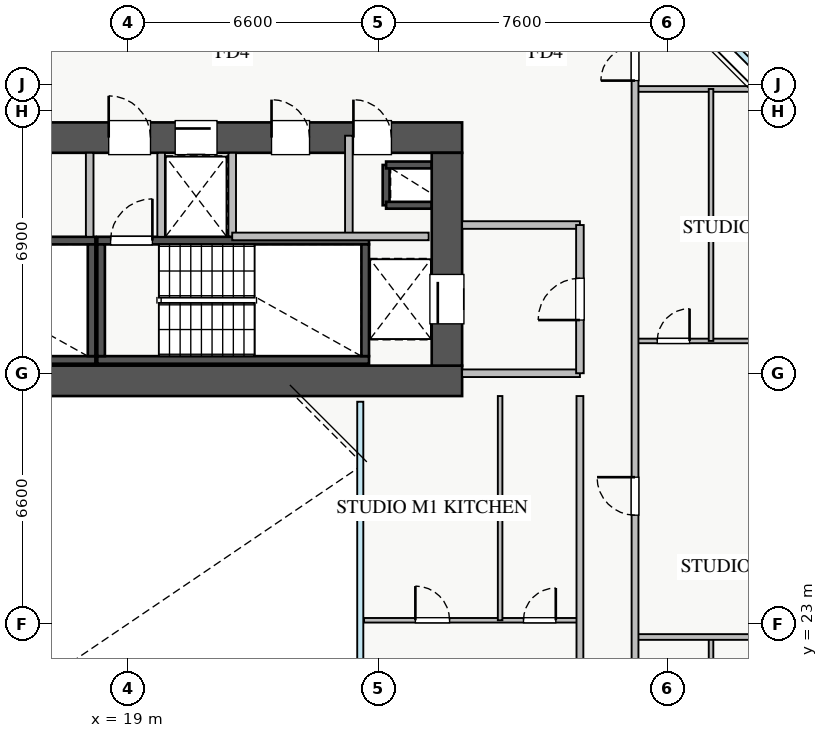
"""IFC4 building model, lengths in metres.
Left out: names, types, materials, properties, quantities, classifications, styles, units other than length and angle.
Written with IfcOpenShell. Run it as: python <this file> out.ifc"""

import sys

from ifc_helpers import new_model, si_unit, direction, frame, frame_2d, origin, place, context, subcontext, project, spatial, rectangle, extrude, source, transform, mapped, element, fill, save


model = new_model("IFC4")
c1 = context("Model", 3, precision=1e-05, world=origin(), true_north=direction((0.0, 1.0)))
c2 = subcontext(c1, "Body", "Model", "MODEL_VIEW")
j1 = project(units=[si_unit("LENGTHUNIT", "METRE"), si_unit("PLANEANGLEUNIT", "RADIAN")], contexts=[c1])
p1 = place(None, origin())
s1 = spatial("IfcSite", under=j1, at=p1, CompositionType="ELEMENT")
p2 = place(p1, origin())
s2 = spatial("IfcBuilding", under=s1, at=p2, CompositionType="ELEMENT")
p3 = place(p2, frame((0.0, 0.0, 86.0)))
s3 = spatial("IfcBuildingStorey", under=s2, at=p3, CompositionType="ELEMENT", Elevation=86.0)
p4 = place(p3, frame((25.8, 34.02, 0.0), z_axis=(0.0, 0.0, 1.0), x_axis=(0.0, 1.0, 0.0)))
e1 = element("IfcWall", 1, at=p4, inside=s3, PredefinedType="SHEAR", context=c2, shape_type="SweptSolid", body=[
    extrude(rectangle(XDim=1.06, YDim=0.18, at=frame_2d((0.53, 0.0))), origin(), (0.0, 0.0, 1.0), 3.07),
])
for number, where, z_axis, x_axis in (
    (2, (25.8, 35.08, 0.0), (0.0, 0.0, 1.0), (1.0, 0.0, 0.0)),
    (3, (25.8, 34.02, 0.0), (0.0, 0.0, 1.0), (1.0, 0.0, 0.0)),
):
    element("IfcWall", number, at=place(p3, frame(where, z_axis=z_axis, x_axis=x_axis)), inside=s3, PredefinedType="SHEAR", context=c2, shape_type="SweptSolid", body=[
        extrude(rectangle(XDim=1.2, YDim=0.18, at=frame_2d((0.6, 0.0))), origin(), (0.0, 0.0, 1.0), 3.07),
    ])
p5 = place(p3, frame((19.88, 33.2, 0.0), z_axis=(0.0, 0.0, 1.0), x_axis=(1.0, 0.0, 0.0)))
e4 = element("IfcWall", 4, at=p5, inside=s3, PredefinedType="SHEAR", context=c2, shape_type="SweptSolid", body=[
    extrude(rectangle(XDim=1.87, YDim=0.18, at=frame_2d((0.935, 0.0))), origin(), (0.0, 0.0, 1.0), 3.07),
])
p6 = place(p3, frame((11.0, 29.95, 0.0), z_axis=(0.0, 0.0, 1.0), x_axis=(1.0, 0.0, 0.0)))
e5 = element("IfcWall", 5, at=p6, inside=s3, PredefinedType="SHEAR", context=c2, shape_type="SweptSolid", body=[
    extrude(rectangle(XDim=7.15, YDim=0.2, at=frame_2d((3.575, 0.0))), origin(), (0.0, 0.0, 1.0), 3.25),
])
p7 = place(p3, frame((11.0, 33.09, 0.0), z_axis=(0.0, 0.0, 1.0), x_axis=(1.0, 0.0, 0.0)))
e6 = element("IfcWall", 6, at=p7, inside=s3, PredefinedType="SHEAR", context=c2, shape_type="SweptSolid", body=[
    extrude(rectangle(XDim=7.15, YDim=0.2, at=frame_2d((3.575, 0.0))), origin(), (0.0, 0.0, 1.0), 3.25),
])
p8 = place(p7, frame((0.35, 0.0, 0.0)))
e7 = element("IfcOpeningElement", 7, at=p8, cuts=e6, PredefinedType="OPENING", context=c2, shape_type="SweptSolid", body=[
    extrude(rectangle(XDim=1.1, YDim=2.05, at=frame_2d((0.55, 1.025))), frame((0.0, 0.11, 0.0), z_axis=(0.0, -1.0, 0.0), x_axis=(1.0, 0.0, 0.0)), (0.0, 0.0, 1.0), 0.22),
])
p9 = place(p3, frame((18.05, 30.05, 0.0), z_axis=(0.0, 0.0, 1.0), x_axis=(0.0, 1.0, 0.0)))
e8 = element("IfcWall", 8, at=p9, inside=s3, PredefinedType="SHEAR", context=c2, shape_type="SweptSolid", body=[
    extrude(rectangle(XDim=2.94, YDim=0.2, at=frame_2d((1.47, 0.0))), origin(), (0.0, 0.0, 1.0), 3.25),
])
p10 = place(p3, frame((18.2, 29.95, 0.0), z_axis=(0.0, 0.0, 1.0), x_axis=(1.0, 0.0, 0.0)))
e9 = element("IfcWall", 9, at=p10, inside=s3, PredefinedType="SHEAR", context=c2, shape_type="SweptSolid", body=[
    extrude(rectangle(XDim=7.15, YDim=0.2, at=frame_2d((3.575, 0.0))), origin(), (0.0, 0.0, 1.0), 3.25),
])
p11 = place(p3, frame((18.2, 33.09, 0.0), z_axis=(0.0, 0.0, 1.0), x_axis=(1.0, 0.0, 0.0)))
e10 = element("IfcWall", 10, at=p11, inside=s3, PredefinedType="SHEAR", context=c2, shape_type="SweptSolid", body=[
    extrude(rectangle(XDim=7.15, YDim=0.2, at=frame_2d((3.575, 0.0))), origin(), (0.0, 0.0, 1.0), 3.25),
])
p12 = place(p11, frame((0.35, 0.0, 0.0)))
e11 = element("IfcOpeningElement", 11, at=p12, cuts=e10, PredefinedType="OPENING", context=c2, shape_type="SweptSolid", body=[
    extrude(rectangle(XDim=1.1, YDim=2.05, at=frame_2d((0.55, 1.025))), frame((0.0, 0.11, 0.0), z_axis=(0.0, -1.0, 0.0), x_axis=(1.0, 0.0, 0.0)), (0.0, 0.0, 1.0), 0.22),
])
for number, where, z_axis, x_axis in (
    (12, (18.3, 30.05, 0.0), (0.0, 0.0, 1.0), (0.0, 1.0, 0.0)),
    (13, (25.25, 30.05, 0.0), (0.0, 0.0, 1.0), (0.0, 1.0, 0.0)),
):
    element("IfcWall", number, at=place(p3, frame(where, z_axis=z_axis, x_axis=x_axis)), inside=s3, PredefinedType="SHEAR", context=c2, shape_type="SweptSolid", body=[
        extrude(rectangle(XDim=2.94, YDim=0.2, at=frame_2d((1.47, 0.0))), origin(), (0.0, 0.0, 1.0), 3.25),
    ])
p13 = place(p3, frame((10.2, 29.4, 0.0), z_axis=(0.0, 0.0, 1.0), x_axis=(1.0, 0.0, 0.0)))
e14 = element("IfcWall", 14, at=p13, inside=s3, PredefinedType="SHEAR", context=c2, shape_type="SweptSolid", body=[
    extrude(rectangle(XDim=17.6, YDim=0.8, at=frame_2d((8.8, 0.0))), origin(), (0.0, 0.0, 1.0), 3.25),
])
p14 = place(p3, frame((10.2, 35.8, 0.0), z_axis=(0.0, 0.0, 1.0), x_axis=(1.0, 0.0, 0.0)))
e15 = element("IfcWall", 15, at=p14, inside=s3, PredefinedType="SHEAR", context=c2, shape_type="SweptSolid", body=[
    extrude(rectangle(XDim=17.6, YDim=0.8, at=frame_2d((8.8, 0.0))), origin(), (0.0, 0.0, 1.0), 3.25),
])
p15 = place(p14, frame((1.15, 0.0, 0.0)))
e16 = element("IfcOpeningElement", 16, at=p15, cuts=e15, PredefinedType="OPENING", context=c2, shape_type="SweptSolid", body=[
    extrude(rectangle(XDim=1.1, YDim=2.05, at=frame_2d((0.55, 1.025))), frame((0.0, 0.41, 0.0), z_axis=(0.0, -1.0, 0.0), x_axis=(1.0, 0.0, 0.0)), (0.0, 0.0, 1.0), 0.82),
])
p16 = place(p14, frame((8.3, 0.0, 0.0)))
e17 = element("IfcOpeningElement", 17, at=p16, cuts=e15, PredefinedType="OPENING", context=c2, shape_type="SweptSolid", body=[
    extrude(rectangle(XDim=1.1, YDim=2.05, at=frame_2d((0.55, 1.025))), frame((0.0, 0.41, 0.0), z_axis=(0.0, -1.0, 0.0), x_axis=(1.0, 0.0, 0.0)), (0.0, 0.0, 1.0), 0.82),
])
p17 = place(p14, frame((10.05, 0.0, 0.0)))
e18 = element("IfcOpeningElement", 18, at=p17, cuts=e15, PredefinedType="OPENING", context=c2, shape_type="SweptSolid", body=[
    extrude(rectangle(XDim=1.1, YDim=2.05, at=frame_2d((0.55, 1.025))), frame((0.0, 0.41, 0.0), z_axis=(0.0, -1.0, 0.0), x_axis=(1.0, 0.0, 0.0)), (0.0, 0.0, 1.0), 0.82),
])
p18 = place(p14, frame((14.74, 0.0, 0.0)))
e19 = element("IfcOpeningElement", 19, at=p18, cuts=e15, PredefinedType="OPENING", context=c2, shape_type="SweptSolid", body=[
    extrude(rectangle(XDim=1.0, YDim=2.05, at=frame_2d((0.5, 1.025))), frame((0.0, 0.41, 0.0), z_axis=(0.0, -1.0, 0.0), x_axis=(1.0, 0.0, 0.0)), (0.0, 0.0, 1.0), 0.82),
])
p19 = place(p14, frame((12.585, 0.0, 0.0)))
e20 = element("IfcOpeningElement", 20, at=p19, cuts=e15, PredefinedType="OPENING", context=c2, shape_type="SweptSolid", body=[
    extrude(rectangle(XDim=1.0, YDim=2.05, at=frame_2d((0.5, 1.025))), frame((0.0, 0.41, 0.0), z_axis=(0.0, -1.0, 0.0), x_axis=(1.0, 0.0, 0.0)), (0.0, 0.0, 1.0), 0.82),
])
p20 = place(p3, frame((27.4, 29.8, 0.0), z_axis=(0.0, 0.0, 1.0), x_axis=(0.0, 1.0, 0.0)))
e21 = element("IfcWall", 21, at=p20, inside=s3, PredefinedType="SHEAR", context=c2, shape_type="SweptSolid", body=[
    extrude(rectangle(XDim=5.6, YDim=0.8, at=frame_2d((2.8, 0.0))), origin(), (0.0, 0.0, 1.0), 3.25),
])
p21 = place(p20, frame((1.1, 0.0, 0.0)))
e22 = element("IfcOpeningElement", 22, at=p21, cuts=e21, PredefinedType="OPENING", context=c2, shape_type="SweptSolid", body=[
    extrude(rectangle(XDim=1.3, YDim=2.05, at=frame_2d((0.65, 1.025))), frame((0.0, 0.41, 0.0), z_axis=(0.0, -1.0, 0.0), x_axis=(1.0, 0.0, 0.0)), (0.0, 0.0, 1.0), 0.82),
])
for number, where, z_axis, x_axis in (
    (23, (27.8, 29.6, 0.0), (0.0, 0.0, 1.0), (1.0, 0.0, 0.0)),
    (24, (27.8, 33.5, 0.0), (0.0, 0.0, 1.0), (1.0, 0.0, 0.0)),
):
    element("IfcWall", number, at=place(p3, frame(where, z_axis=z_axis, x_axis=x_axis)), inside=s3, PredefinedType="PARTITIONING", context=c2, shape_type="SweptSolid", body=[
        extrude(rectangle(XDim=3.1, YDim=0.2, at=frame_2d((1.55, 0.0))), origin(), (0.0, 0.0, 1.0), 3.07),
    ])
p22 = place(p3, frame((30.9, 29.6, 0.0), z_axis=(0.0, 0.0, 1.0), x_axis=(0.0, 1.0, 0.0)))
e25 = element("IfcWall", 25, at=p22, inside=s3, PredefinedType="PARTITIONING", context=c2, shape_type="SweptSolid", body=[
    extrude(rectangle(XDim=3.9, YDim=0.2, at=frame_2d((1.95, 0.0))), origin(), (0.0, 0.0, 1.0), 3.07),
])
p23 = place(p22, frame((1.4, 0.0, 0.0)))
e26 = element("IfcOpeningElement", 26, at=p23, cuts=e25, PredefinedType="OPENING", context=c2, shape_type="SweptSolid", body=[
    extrude(rectangle(XDim=1.1, YDim=2.05, at=frame_2d((0.55, 1.025))), frame((0.0, 0.11, 0.0), z_axis=(0.0, -1.0, 0.0), x_axis=(1.0, 0.0, 0.0)), (0.0, 0.0, 1.0), 0.22),
])
for number, where, z_axis, x_axis in (
    (27, (18.0, 33.19, 0.0), (0.0, 0.0, 1.0), (0.0, 1.0, 0.0)),
    (28, (19.88, 33.19, 0.0), (0.0, 0.0, 1.0), (0.0, 1.0, 0.0)),
):
    element("IfcWall", number, at=place(p3, frame(where, z_axis=z_axis, x_axis=x_axis)), inside=s3, PredefinedType="PARTITIONING", context=c2, shape_type="SweptSolid", body=[
        extrude(rectangle(XDim=2.21, YDim=0.2, at=frame_2d((1.105, 0.0))), origin(), (0.0, 0.0, 1.0), 3.07),
    ])
p24 = place(p3, frame((24.82, 33.2, 0.0), z_axis=(0.0, 0.0, 1.0), x_axis=(0.0, 1.0, 0.0)))
e29 = element("IfcWall", 29, at=p24, inside=s3, PredefinedType="PARTITIONING", context=c2, shape_type="SweptSolid", body=[
    extrude(rectangle(XDim=2.65, YDim=0.2, at=frame_2d((1.325, 0.0))), origin(), (0.0, 0.0, 1.0), 3.07),
])
p25 = place(p3, frame((21.75, 33.2, 0.0), z_axis=(0.0, 0.0, 1.0), x_axis=(0.0, 1.0, 0.0)))
e30 = element("IfcWall", 30, at=p25, inside=s3, PredefinedType="PARTITIONING", context=c2, shape_type="SweptSolid", body=[
    extrude(rectangle(XDim=2.2, YDim=0.2, at=frame_2d((1.1, 0.0))), origin(), (0.0, 0.0, 1.0), 3.07),
])
p26 = place(p3, frame((21.75, 33.2, 0.0), z_axis=(0.0, 0.0, 1.0), x_axis=(1.0, 0.0, 0.0)))
e31 = element("IfcWall", 31, at=p26, inside=s3, PredefinedType="PARTITIONING", context=c2, shape_type="SweptSolid", body=[
    extrude(rectangle(XDim=5.17, YDim=0.2, at=frame_2d((2.585, 0.0))), origin(), (0.0, 0.0, 1.0), 3.07),
])
p27 = place(p3, frame((32.35, 37.08, 0.0), z_axis=(0.0, 0.0, 1.0), x_axis=(1.0, 0.0, 0.0)))
e32 = element("IfcWall", 32, at=p27, inside=s3, PredefinedType="PARTITIONING", context=c2, shape_type="SweptSolid", body=[
    extrude(rectangle(XDim=5.4, YDim=0.15, at=frame_2d((2.7, 0.0))), origin(), (0.0, 0.0, 1.0), 3.07),
])
p28 = place(p3, frame((34.35, 16.34, 0.0), z_axis=(0.0, 0.0, 1.0), x_axis=(0.0, 1.0, 0.0)))
e33 = element("IfcWall", 33, at=p28, inside=s3, PredefinedType="PLUMBINGWALL", context=c2, shape_type="SweptSolid", body=[
    extrude(rectangle(XDim=6.32, YDim=0.12, at=frame_2d((3.16, 0.0))), origin(), (0.0, 0.0, 1.0), 3.07),
])
p29 = place(p3, frame((32.35, 30.45, 0.0), z_axis=(0.0, 0.0, 1.0), x_axis=(1.0, 0.0, 0.0)))
e34 = element("IfcWall", 34, at=p29, inside=s3, PredefinedType="PLUMBINGWALL", context=c2, shape_type="SweptSolid", body=[
    extrude(rectangle(XDim=5.4, YDim=0.12, at=frame_2d((2.7, 0.0))), origin(), (0.0, 0.0, 1.0), 3.07),
])
p30 = place(p29, frame((0.585, 0.0, 0.0)))
e35 = element("IfcOpeningElement", 35, at=p30, cuts=e34, PredefinedType="OPENING", context=c2, shape_type="SweptSolid", body=[
    extrude(rectangle(XDim=0.85, YDim=2.05, at=frame_2d((0.425, 1.025))), frame((0.0, 0.07, 0.0), z_axis=(0.0, -1.0, 0.0), x_axis=(1.0, 0.0, 0.0)), (0.0, 0.0, 1.0), 0.14),
])
p31 = place(p29, frame((3.24, 0.0, 0.0)))
e36 = element("IfcOpeningElement", 36, at=p31, cuts=e34, PredefinedType="OPENING", context=c2, shape_type="SweptSolid", body=[
    extrude(rectangle(XDim=0.9, YDim=2.05, at=frame_2d((0.45, 1.025))), frame((0.0, 0.07, 0.0), z_axis=(0.0, -1.0, 0.0), x_axis=(1.0, 0.0, 0.0)), (0.0, 0.0, 1.0), 0.14),
])
p32 = place(p3, frame((34.35, 30.45, 0.0), z_axis=(0.0, 0.0, 1.0), x_axis=(0.0, 1.0, 0.0)))
e37 = element("IfcWall", 37, at=p32, inside=s3, PredefinedType="PLUMBINGWALL", context=c2, shape_type="SweptSolid", body=[
    extrude(rectangle(XDim=6.63, YDim=0.12, at=frame_2d((3.315, 0.0))), origin(), (0.0, 0.0, 1.0), 3.07),
])
p33 = place(p3, frame((32.35, 22.66, 0.0), z_axis=(0.0, 0.0, 1.0), x_axis=(1.0, 0.0, 0.0)))
e38 = element("IfcWall", 38, at=p33, inside=s3, PredefinedType="PARTITIONING", context=c2, shape_type="SweptSolid", body=[
    extrude(rectangle(XDim=5.4, YDim=0.15, at=frame_2d((2.7, 0.0))), origin(), (0.0, 0.0, 1.0), 3.07),
])
p34 = place(p3, frame((32.35, 7.21, 0.0), z_axis=(0.0, 0.0, 1.0), x_axis=(0.0, 1.0, 0.0)))
e39 = element("IfcWall", 39, at=p34, inside=s3, PredefinedType="PARTITIONING", context=c2, shape_type="SweptSolid", body=[
    extrude(rectangle(XDim=31.23, YDim=0.18, at=frame_2d((15.615, 0.0))), origin(), (0.0, 0.0, 1.0), 2.715),
])
p35 = place(p34, frame((30.09, 0.0, 0.0)))
e40 = element("IfcOpeningElement", 40, at=p35, cuts=e39, PredefinedType="OPENING", context=c2, shape_type="SweptSolid", body=[
    extrude(rectangle(XDim=0.9, YDim=2.05, at=frame_2d((0.45, 1.025))), frame((0.0, 0.1, 0.0), z_axis=(0.0, -1.0, 0.0), x_axis=(1.0, 0.0, 0.0)), (0.0, 0.0, 1.0), 0.2),
])
p36 = place(p34, frame((0.415, 0.0, 0.0)))
e41 = element("IfcOpeningElement", 41, at=p36, cuts=e39, PredefinedType="OPENING", context=c2, shape_type="SweptSolid", body=[
    extrude(rectangle(XDim=0.9, YDim=2.05, at=frame_2d((0.45, 1.025))), frame((0.0, 0.1, 0.0), z_axis=(0.0, -1.0, 0.0), x_axis=(1.0, 0.0, 0.0)), (0.0, 0.0, 1.0), 0.2),
])
p37 = place(p34, frame((4.73, 0.0, 0.0)))
e42 = element("IfcOpeningElement", 42, at=p37, cuts=e39, PredefinedType="OPENING", context=c2, shape_type="SweptSolid", body=[
    extrude(rectangle(XDim=1.0, YDim=2.05, at=frame_2d((0.5, 1.025))), frame((0.0, 0.1, 0.0), z_axis=(0.0, -1.0, 0.0), x_axis=(1.0, 0.0, 0.0)), (0.0, 0.0, 1.0), 0.2),
])
p38 = place(p34, frame((18.655, 0.0, 0.0)))
e43 = element("IfcOpeningElement", 43, at=p38, cuts=e39, PredefinedType="OPENING", context=c2, shape_type="SweptSolid", body=[
    extrude(rectangle(XDim=1.0, YDim=2.05, at=frame_2d((0.5, 1.025))), frame((0.0, 0.1, 0.0), z_axis=(0.0, -1.0, 0.0), x_axis=(1.0, 0.0, 0.0)), (0.0, 0.0, 1.0), 0.2),
])
p39 = place(p3, frame((25.22, 23.1, 0.0), z_axis=(0.0, 0.0, 1.0), x_axis=(1.0, 0.0, 0.0)))
e44 = element("IfcWall", 44, at=p39, inside=s3, PredefinedType="PLUMBINGWALL", context=c2, shape_type="SweptSolid", body=[
    extrude(rectangle(XDim=5.68, YDim=0.12, at=frame_2d((2.84, 0.0))), origin(), (0.0, 0.0, 1.0), 3.07),
])
p40 = place(p39, frame((1.35, 0.0, 0.0)))
e45 = element("IfcOpeningElement", 45, at=p40, cuts=e44, PredefinedType="OPENING", context=c2, shape_type="SweptSolid", body=[
    extrude(rectangle(XDim=0.9, YDim=2.05, at=frame_2d((0.45, 1.025))), frame((0.0, 0.07, 0.0), z_axis=(0.0, -1.0, 0.0), x_axis=(1.0, 0.0, 0.0)), (0.0, 0.0, 1.0), 0.14),
])
p41 = place(p39, frame((4.195, 0.0, 0.0)))
e46 = element("IfcOpeningElement", 46, at=p41, cuts=e44, PredefinedType="OPENING", context=c2, shape_type="SweptSolid", body=[
    extrude(rectangle(XDim=0.85, YDim=2.05, at=frame_2d((0.425, 1.025))), frame((0.0, 0.07, 0.0), z_axis=(0.0, -1.0, 0.0), x_axis=(1.0, 0.0, 0.0)), (0.0, 0.0, 1.0), 0.14),
])
p42 = place(p3, frame((28.8, 23.1, 0.0), z_axis=(0.0, 0.0, 1.0), x_axis=(0.0, 1.0, 0.0)))
e47 = element("IfcWall", 47, at=p42, inside=s3, PredefinedType="PLUMBINGWALL", context=c2, shape_type="SweptSolid", body=[
    extrude(rectangle(XDim=5.9, YDim=0.12, at=frame_2d((2.95, 0.0))), origin(), (0.0, 0.0, 1.0), 3.07),
])
p43 = place(p3, frame((30.9, 17.0, 0.0), z_axis=(0.0, 0.0, 1.0), x_axis=(0.0, 1.0, 0.0)))
e48 = element("IfcWall", 48, at=p43, inside=s3, PredefinedType="PARTITIONING", context=c2, shape_type="SweptSolid", body=[
    extrude(rectangle(XDim=12.0, YDim=0.18, at=frame_2d((6.0, 0.0))), origin(), (0.0, 0.0, 1.0), 3.07),
])
p44 = place(p43, frame((2.36, 0.0, 0.0)))
e49 = element("IfcOpeningElement", 49, at=p44, cuts=e48, PredefinedType="OPENING", context=c2, shape_type="SweptSolid", body=[
    extrude(rectangle(XDim=1.0, YDim=2.05, at=frame_2d((0.5, 1.025))), frame((0.0, 0.1, 0.0), z_axis=(0.0, -1.0, 0.0), x_axis=(1.0, 0.0, 0.0)), (0.0, 0.0, 1.0), 0.2),
])
m1 = source(origin(), c2, "Body", "SweptSolid", [
    extrude(rectangle(XDim=1.3, YDim=2.05, at=frame_2d((0.65, 1.025))), frame((0.0, 0.025, 0.0), z_axis=(0.0, -1.0, 0.0), x_axis=(1.0, 0.0, 0.0)), (0.0, 0.0, 1.0), 0.05),
])
p45 = place(p21, origin())
e50 = element("IfcDoor", 50, at=p45, inside=s3, OperationType="SLIDING_TO_LEFT", PredefinedType="DOOR", context=c2, shape_type="MappedRepresentation", body=[
    mapped(m1, transform((0.0, 0.0, 0.0), x_axis=(1.0, 0.0, 0.0), y_axis=(0.0, 1.0, 0.0), z_axis=(0.0, 0.0, 1.0), scale=1.0)),
])
fill(e22, e50)
m2 = source(origin(), c2, "Body", "SweptSolid", [
    extrude(rectangle(XDim=1.1, YDim=2.05, at=frame_2d((0.55, 1.025))), frame((0.0, 0.025, 0.0), z_axis=(0.0, -1.0, 0.0), x_axis=(1.0, 0.0, 0.0)), (0.0, 0.0, 1.0), 0.05),
])
p46 = place(p16, origin())
e51 = element("IfcDoor", 51, at=p46, inside=s3, OperationType="SINGLE_SWING_LEFT", PredefinedType="DOOR", context=c2, shape_type="MappedRepresentation", body=[
    mapped(m2, transform((0.0, 0.0, 0.0), x_axis=(1.0, 0.0, 0.0), y_axis=(0.0, 1.0, 0.0), z_axis=(0.0, 0.0, 1.0), scale=1.0)),
])
fill(e17, e51)
p47 = place(p12, origin())
e52 = element("IfcDoor", 52, at=p47, inside=s3, OperationType="SINGLE_SWING_RIGHT", PredefinedType="DOOR", context=c2, shape_type="MappedRepresentation", body=[
    mapped(m2, transform((0.0, 0.0, 0.0), x_axis=(1.0, 0.0, 0.0), y_axis=(0.0, 1.0, 0.0), z_axis=(0.0, 0.0, 1.0), scale=1.0)),
])
fill(e11, e52)
p48 = place(p17, origin())
e53 = element("IfcDoor", 53, at=p48, inside=s3, OperationType="SLIDING_TO_LEFT", PredefinedType="DOOR", context=c2, shape_type="MappedRepresentation", body=[
    mapped(m2, transform((0.0, 0.0, 0.0), x_axis=(1.0, 0.0, 0.0), y_axis=(0.0, 1.0, 0.0), z_axis=(0.0, 0.0, 1.0), scale=1.0)),
])
fill(e18, e53)
m3 = source(origin(), c2, "Body", "SweptSolid", [
    extrude(rectangle(XDim=1.0, YDim=2.05, at=frame_2d((0.5, 1.025))), frame((0.0, 0.025, 0.0), z_axis=(0.0, -1.0, 0.0), x_axis=(1.0, 0.0, 0.0)), (0.0, 0.0, 1.0), 0.05),
])
p49 = place(p18, origin())
e54 = element("IfcDoor", 54, at=p49, inside=s3, OperationType="SINGLE_SWING_LEFT", PredefinedType="DOOR", context=c2, shape_type="MappedRepresentation", body=[
    mapped(m3, transform((0.0, 0.0, 0.0), x_axis=(1.0, 0.0, 0.0), y_axis=(0.0, 1.0, 0.0), z_axis=(0.0, 0.0, 1.0), scale=1.0)),
])
fill(e19, e54)
p50 = place(p19, origin())
e55 = element("IfcDoor", 55, at=p50, inside=s3, OperationType="SINGLE_SWING_LEFT", PredefinedType="DOOR", context=c2, shape_type="MappedRepresentation", body=[
    mapped(m3, transform((0.0, 0.0, 0.0), x_axis=(1.0, 0.0, 0.0), y_axis=(0.0, 1.0, 0.0), z_axis=(0.0, 0.0, 1.0), scale=1.0)),
])
fill(e20, e55)
p51 = place(p23, origin())
e56 = element("IfcDoor", 56, at=p51, inside=s3, OperationType="SINGLE_SWING_LEFT", PredefinedType="DOOR", context=c2, shape_type="MappedRepresentation", body=[
    mapped(m2, transform((0.0, 0.0, 0.0), x_axis=(1.0, 0.0, 0.0), y_axis=(0.0, 1.0, 0.0), z_axis=(0.0, 0.0, 1.0), scale=1.0)),
])
fill(e26, e56)
m4 = source(origin(), c2, "Body", "SweptSolid", [
    extrude(rectangle(XDim=0.85, YDim=2.05, at=frame_2d((0.425, 1.025))), frame((0.0, 0.025, 0.0), z_axis=(0.0, -1.0, 0.0), x_axis=(1.0, 0.0, 0.0)), (0.0, 0.0, 1.0), 0.05),
])
p52 = place(p30, origin())
e57 = element("IfcDoor", 57, at=p52, inside=s3, OperationType="SINGLE_SWING_RIGHT", PredefinedType="DOOR", context=c2, shape_type="MappedRepresentation", body=[
    mapped(m4, transform((0.0, 0.0, 0.0), x_axis=(1.0, 0.0, 0.0), y_axis=(0.0, 1.0, 0.0), z_axis=(0.0, 0.0, 1.0), scale=1.0)),
])
fill(e35, e57)
m5 = source(origin(), c2, "Body", "SweptSolid", [
    extrude(rectangle(XDim=0.9, YDim=2.05, at=frame_2d((0.45, 1.025))), frame((0.0, 0.025, 0.0), z_axis=(0.0, -1.0, 0.0), x_axis=(1.0, 0.0, 0.0)), (0.0, 0.0, 1.0), 0.05),
])
p53 = place(p35, origin())
e58 = element("IfcDoor", 58, at=p53, inside=s3, OperationType="SINGLE_SWING_LEFT", PredefinedType="DOOR", context=c2, shape_type="MappedRepresentation", body=[
    mapped(m5, transform((0.0, 0.0, 0.0), x_axis=(1.0, 0.0, 0.0), y_axis=(0.0, 1.0, 0.0), z_axis=(0.0, 0.0, 1.0), scale=1.0)),
])
fill(e40, e58)
p54 = place(p38, origin())
e59 = element("IfcDoor", 59, at=p54, inside=s3, OperationType="SINGLE_SWING_RIGHT", PredefinedType="DOOR", context=c2, shape_type="MappedRepresentation", body=[
    mapped(m3, transform((0.0, 0.0, 0.0), x_axis=(1.0, 0.0, 0.0), y_axis=(0.0, 1.0, 0.0), z_axis=(0.0, 0.0, 1.0), scale=1.0)),
])
fill(e43, e59)
p55 = place(p40, origin())
e60 = element("IfcDoor", 60, at=p55, inside=s3, OperationType="SINGLE_SWING_LEFT", PredefinedType="DOOR", context=c2, shape_type="MappedRepresentation", body=[
    mapped(m5, transform((0.0, 0.0, 0.0), x_axis=(1.0, 0.0, 0.0), y_axis=(0.0, 1.0, 0.0), z_axis=(0.0, 0.0, 1.0), scale=1.0)),
])
fill(e45, e60)
p56 = place(p41, origin())
e61 = element("IfcDoor", 61, at=p56, inside=s3, OperationType="SINGLE_SWING_RIGHT", PredefinedType="DOOR", context=c2, shape_type="MappedRepresentation", body=[
    mapped(m4, transform((0.0, 0.0, 0.0), x_axis=(1.0, 0.0, 0.0), y_axis=(0.0, 1.0, 0.0), z_axis=(0.0, 0.0, 1.0), scale=1.0)),
])
fill(e46, e61)
save(model, sys.argv[1])
